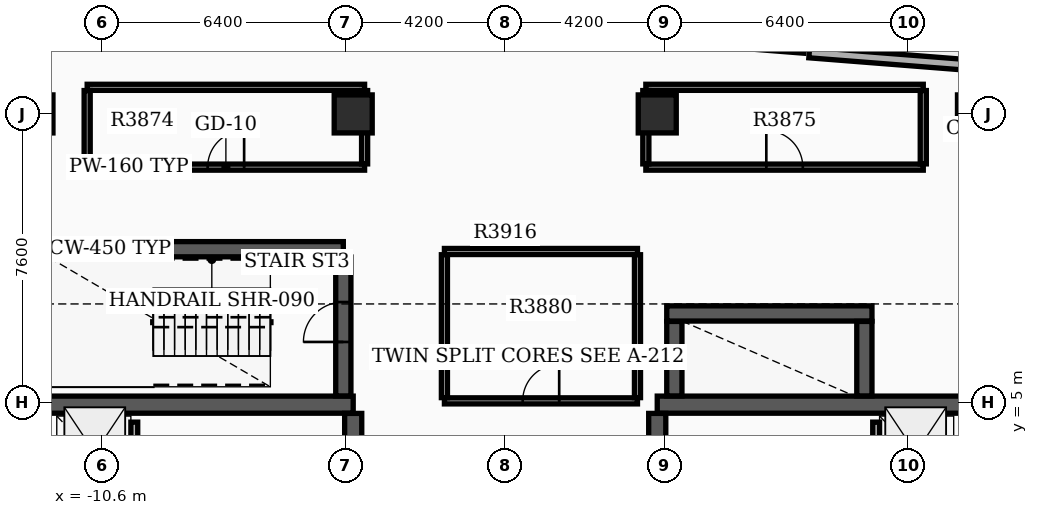
"""IFC4 building model, lengths in metres.
Left out: names, types, materials, properties, quantities, classifications, styles, units other than length and angle.
Written with IfcOpenShell. Run it as: python <this file> out.ifc"""

import sys

from ifc_helpers import new_model, si_unit, direction, frame, frame_2d, origin, origin_2d, place, context, subcontext, project, spatial, rectangle, extrude, element, fill, save


model = new_model("IFC4")
c1 = context("Model", 3, precision=1e-05, world=origin(), true_north=direction((0.0, 1.0)))
c2 = subcontext(c1, "Body", "Model", "MODEL_VIEW")
j1 = project(units=[si_unit("LENGTHUNIT", "METRE"), si_unit("PLANEANGLEUNIT", "RADIAN")], contexts=[c1])
p1 = place(None, origin())
s1 = spatial("IfcSite", under=j1, at=p1, CompositionType="ELEMENT")
p2 = place(p1, origin())
s2 = spatial("IfcBuilding", under=s1, at=p2, CompositionType="ELEMENT")
p3 = place(p2, frame((0.0, 0.0, 245.4)))
s3 = spatial("IfcBuildingStorey", under=s2, at=p3, CompositionType="ELEMENT", Elevation=245.4)
p4 = place(p3, frame((-12.4, 4.95, 0.0), z_axis=(0.0, 0.0, 1.0), x_axis=(1.0, 0.0, 0.0)))
e1 = element("IfcWall", 1, at=p4, inside=s3, PredefinedType="SHEAR", context=c2, shape_type="SweptSolid", body=[
    extrude(rectangle(XDim=8.4, YDim=0.45, at=frame_2d((4.2, 0.0))), origin(), (0.0, 0.0, 1.0), 4.3),
])
p5 = place(p3, frame((-4.0, -6.62, 0.0), z_axis=(0.0, 0.0, 1.0), x_axis=(0.0, 1.0, 0.0)))
e2 = element("IfcWall", 2, at=p5, inside=s3, PredefinedType="SHEAR", context=c2, shape_type="SweptSolid", body=[
    extrude(rectangle(XDim=11.34, YDim=0.45, at=frame_2d((5.67, 0.0))), origin(), (0.0, 0.0, 1.0), 4.3),
])
p6 = place(p5, frame((1.37, 0.0, 0.0)))
e3 = element("IfcOpeningElement", 3, at=p6, cuts=e2, PredefinedType="OPENING", context=c2, shape_type="SweptSolid", body=[
    extrude(rectangle(XDim=1.05, YDim=2.15, at=frame_2d((0.525, 1.075))), frame((0.0, 0.235, 0.0), z_axis=(0.0, -1.0, 0.0), x_axis=(1.0, 0.0, 0.0)), (0.0, 0.0, 1.0), 0.47),
])
p7 = place(p5, frame((6.97, 0.0, 0.0)))
e4 = element("IfcOpeningElement", 4, at=p7, cuts=e2, PredefinedType="OPENING", context=c2, shape_type="SweptSolid", body=[
    extrude(rectangle(XDim=1.05, YDim=2.15, at=frame_2d((0.525, 1.075))), frame((0.0, 0.235, 0.0), z_axis=(0.0, -1.0, 0.0), x_axis=(1.0, 0.0, 0.0)), (0.0, 0.0, 1.0), 0.47),
])
p8 = place(p3, frame((4.0, 4.95, 0.0), z_axis=(0.0, 0.0, 1.0), x_axis=(1.0, 0.0, 0.0)))
e5 = element("IfcWall", 5, at=p8, inside=s3, PredefinedType="SHEAR", context=c2, shape_type="SweptSolid", body=[
    extrude(rectangle(XDim=8.4, YDim=0.45, at=frame_2d((4.2, 0.0))), origin(), (0.0, 0.0, 1.0), 4.3),
])
p9 = place(p3, frame((4.0, -6.62, 0.0), z_axis=(0.0, 0.0, 1.0), x_axis=(0.0, 1.0, 0.0)))
e6 = element("IfcWall", 6, at=p9, inside=s3, PredefinedType="SHEAR", context=c2, shape_type="SweptSolid", body=[
    extrude(rectangle(XDim=11.34, YDim=0.45, at=frame_2d((5.67, 0.0))), origin(), (0.0, 0.0, 1.0), 4.3),
])
p10 = place(p9, frame((1.37, 0.0, 0.0)))
e7 = element("IfcOpeningElement", 7, at=p10, cuts=e6, PredefinedType="OPENING", context=c2, shape_type="SweptSolid", body=[
    extrude(rectangle(XDim=1.05, YDim=2.15, at=frame_2d((0.525, 1.075))), frame((0.0, 0.235, 0.0), z_axis=(0.0, -1.0, 0.0), x_axis=(1.0, 0.0, 0.0)), (0.0, 0.0, 1.0), 0.47),
])
p11 = place(p9, frame((6.97, 0.0, 0.0)))
e8 = element("IfcOpeningElement", 8, at=p11, cuts=e6, PredefinedType="OPENING", context=c2, shape_type="SweptSolid", body=[
    extrude(rectangle(XDim=1.05, YDim=2.15, at=frame_2d((0.525, 1.075))), frame((0.0, 0.235, 0.0), z_axis=(0.0, -1.0, 0.0), x_axis=(1.0, 0.0, 0.0)), (0.0, 0.0, 1.0), 0.47),
])
p12 = place(p3, frame((-12.22, 9.04, 0.0), z_axis=(0.0, 0.0, 1.0), x_axis=(1.0, 0.0, 0.0)))
e9 = element("IfcWall", 9, at=p12, inside=s3, PredefinedType="SHEAR", context=c2, shape_type="SweptSolid", body=[
    extrude(rectangle(XDim=7.96, YDim=0.4, at=frame_2d((3.98, 0.0))), origin(), (0.0, 0.0, 1.0), 4.3),
])
p13 = place(p3, frame((-4.26, 5.18, 0.0), z_axis=(0.0, 0.0, 1.0), x_axis=(0.0, 1.0, 0.0)))
e10 = element("IfcWall", 10, at=p13, inside=s3, PredefinedType="SHEAR", context=c2, shape_type="SweptSolid", body=[
    extrude(rectangle(XDim=3.655, YDim=0.4, at=frame_2d((1.828, 0.0))), origin(), (0.0, 0.0, 1.0), 4.3),
])
p14 = place(p13, frame((1.42, 0.0, 0.0)))
e11 = element("IfcOpeningElement", 11, at=p14, cuts=e10, PredefinedType="OPENING", context=c2, shape_type="SweptSolid", body=[
    extrude(rectangle(XDim=1.05, YDim=2.15, at=frame_2d((0.525, 1.075))), frame((0.0, 0.21, 0.0), z_axis=(0.0, -1.0, 0.0), x_axis=(1.0, 0.0, 0.0)), (0.0, 0.0, 1.0), 0.42),
])
p15 = place(p3, frame((4.45, 5.18, 0.0), z_axis=(0.0, 0.0, 1.0), x_axis=(0.0, 1.0, 0.0)))
e12 = element("IfcWall", 12, at=p15, inside=s3, PredefinedType="SHEAR", context=c2, shape_type="SweptSolid", body=[
    extrude(rectangle(XDim=1.96, YDim=0.4, at=frame_2d((0.98, 0.0))), origin(), (0.0, 0.0, 1.0), 4.3),
])
p16 = place(p3, frame((4.25, 7.35, 0.0), z_axis=(0.0, 0.0, 1.0), x_axis=(1.0, 0.0, 0.0)))
e13 = element("IfcWall", 13, at=p16, inside=s3, PredefinedType="SHEAR", context=c2, shape_type="SweptSolid", body=[
    extrude(rectangle(XDim=5.4, YDim=0.4, at=frame_2d((2.7, 0.0))), origin(), (0.0, 0.0, 1.0), 4.3),
])
p17 = place(p3, frame((9.45, 5.18, 0.0), z_axis=(0.0, 0.0, 1.0), x_axis=(0.0, 1.0, 0.0)))
e14 = element("IfcWall", 14, at=p17, inside=s3, PredefinedType="SHEAR", context=c2, shape_type="SweptSolid", body=[
    extrude(rectangle(XDim=1.96, YDim=0.4, at=frame_2d((0.98, 0.0))), origin(), (0.0, 0.0, 1.0), 4.3),
])
for number, where, z_axis, x_axis in (
    (15, (12.4, 12.6, 0.0), (0.0, 0.0, 1.0), (1.0, 0.0, 0.0)),
    (16, (-12.4, 12.6, 0.0), (0.0, 0.0, 1.0), (1.0, 0.0, 0.0)),
    (17, (4.0, 12.6, 0.0), (0.0, 0.0, 1.0), (1.0, 0.0, 0.0)),
    (18, (-4.0, 12.6, 0.0), (0.0, 0.0, 1.0), (1.0, 0.0, 0.0)),
):
    element("IfcColumn", number, at=place(p3, frame(where, z_axis=z_axis, x_axis=x_axis)), inside=s3, PredefinedType="COLUMN", context=c2, shape_type="SweptSolid", body=[
        extrude(rectangle(XDim=1.0, YDim=1.0, at=origin_2d()), origin(), (0.0, 0.0, 1.0), 4.5),
    ])
p18 = place(p3, frame((14.281, 13.722, 0.0), z_axis=(0.0, 0.0, 1.0), x_axis=(-0.99691915642, 0.078435932851, 0.0)))
e19 = element("IfcWall", 19, at=p18, inside=s3, PredefinedType="STANDARD", context=c2, shape_type="SweptSolid", body=[
    extrude(rectangle(XDim=6.3, YDim=0.28, at=frame_2d((3.15, 0.0))), origin(), (0.0, 0.0, 1.0), 3.38),
])
for number, where, z_axis, x_axis in (
    (20, (-9.76, 2.5, 0.0), (0.0, 0.0, 1.0), (0.0, 1.0, 0.0)),
    (21, (9.76, 2.5, 0.0), (0.0, 0.0, 1.0), (0.0, 1.0, 0.0)),
):
    element("IfcWall", number, at=place(p3, frame(where, z_axis=z_axis, x_axis=x_axis)), inside=s3, PredefinedType="SOLIDWALL", context=c2, shape_type="SweptSolid", body=[
        extrude(rectangle(XDim=1.99, YDim=0.18, at=frame_2d((0.995, 0.0))), origin(), (0.0, 0.0, 1.0), 3.37),
    ])
p19 = place(p3, frame((-11.0, 11.2, 0.0), z_axis=(0.0, 0.0, 1.0), x_axis=(1.0, 0.0, 0.0)))
e22 = element("IfcWall", 22, at=p19, inside=s3, PredefinedType="PARTITIONING", context=c2, shape_type="SweptSolid", body=[
    extrude(rectangle(XDim=7.3, YDim=0.16, at=frame_2d((3.65, 0.0))), origin(), (0.0, 0.0, 1.0), 3.37),
])
p20 = place(p19, frame((3.17, 0.0, 0.0)))
e23 = element("IfcOpeningElement", 23, at=p20, cuts=e22, PredefinedType="OPENING", context=c2, shape_type="SweptSolid", body=[
    extrude(rectangle(XDim=0.96, YDim=2.15, at=frame_2d((0.48, 1.075))), frame((0.0, 0.09, 0.0), z_axis=(0.0, -1.0, 0.0), x_axis=(1.0, 0.0, 0.0)), (0.0, 0.0, 1.0), 0.18),
])
p21 = place(p3, frame((-11.0, 13.3, 0.0), z_axis=(0.0, 0.0, 1.0), x_axis=(1.0, 0.0, 0.0)))
e24 = element("IfcWall", 24, at=p21, inside=s3, PredefinedType="PARTITIONING", context=c2, shape_type="SweptSolid", body=[
    extrude(rectangle(XDim=7.3, YDim=0.16, at=frame_2d((3.65, 0.0))), origin(), (0.0, 0.0, 1.0), 3.37),
])
for number, where, z_axis, x_axis in (
    (25, (-11.0, 11.285, 0.0), (0.0, 0.0, 1.0), (0.0, 1.0, 0.0)),
    (26, (-3.7, 11.285, 0.0), (0.0, 0.0, 1.0), (0.0, 1.0, 0.0)),
):
    element("IfcWall", number, at=place(p3, frame(where, z_axis=z_axis, x_axis=x_axis)), inside=s3, PredefinedType="PARTITIONING", context=c2, shape_type="SweptSolid", body=[
        extrude(rectangle(XDim=1.93, YDim=0.16, at=frame_2d((0.965, 0.0))), origin(), (0.0, 0.0, 1.0), 3.37),
    ])
p22 = place(p3, frame((3.7, 11.2, 0.0), z_axis=(0.0, 0.0, 1.0), x_axis=(1.0, 0.0, 0.0)))
e27 = element("IfcWall", 27, at=p22, inside=s3, PredefinedType="PARTITIONING", context=c2, shape_type="SweptSolid", body=[
    extrude(rectangle(XDim=7.3, YDim=0.16, at=frame_2d((3.65, 0.0))), origin(), (0.0, 0.0, 1.0), 3.37),
])
p23 = place(p22, frame((3.17, 0.0, 0.0)))
e28 = element("IfcOpeningElement", 28, at=p23, cuts=e27, PredefinedType="OPENING", context=c2, shape_type="SweptSolid", body=[
    extrude(rectangle(XDim=0.96, YDim=2.15, at=frame_2d((0.48, 1.075))), frame((0.0, 0.09, 0.0), z_axis=(0.0, -1.0, 0.0), x_axis=(1.0, 0.0, 0.0)), (0.0, 0.0, 1.0), 0.18),
])
p24 = place(p3, frame((3.7, 13.3, 0.0), z_axis=(0.0, 0.0, 1.0), x_axis=(1.0, 0.0, 0.0)))
e29 = element("IfcWall", 29, at=p24, inside=s3, PredefinedType="PARTITIONING", context=c2, shape_type="SweptSolid", body=[
    extrude(rectangle(XDim=7.3, YDim=0.16, at=frame_2d((3.65, 0.0))), origin(), (0.0, 0.0, 1.0), 3.37),
])
for number, where, z_axis, x_axis in (
    (30, (3.7, 11.285, 0.0), (0.0, 0.0, 1.0), (0.0, 1.0, 0.0)),
    (31, (11.0, 11.285, 0.0), (0.0, 0.0, 1.0), (0.0, 1.0, 0.0)),
):
    element("IfcWall", number, at=place(p3, frame(where, z_axis=z_axis, x_axis=x_axis)), inside=s3, PredefinedType="PARTITIONING", context=c2, shape_type="SweptSolid", body=[
        extrude(rectangle(XDim=1.93, YDim=0.16, at=frame_2d((0.965, 0.0))), origin(), (0.0, 0.0, 1.0), 3.37),
    ])
p25 = place(p3, frame((-1.6, 5.05, 0.0), z_axis=(0.0, 0.0, 1.0), x_axis=(1.0, 0.0, 0.0)))
e32 = element("IfcWall", 32, at=p25, inside=s3, PredefinedType="PARTITIONING", context=c2, shape_type="SweptSolid", body=[
    extrude(rectangle(XDim=5.08, YDim=0.16, at=frame_2d((2.54, 0.0))), origin(), (0.0, 0.0, 1.0), 3.37),
])
p26 = place(p25, frame((2.06, 0.0, 0.0)))
e33 = element("IfcOpeningElement", 33, at=p26, cuts=e32, PredefinedType="OPENING", context=c2, shape_type="SweptSolid", body=[
    extrude(rectangle(XDim=0.96, YDim=2.15, at=frame_2d((0.48, 1.075))), frame((0.0, 0.09, 0.0), z_axis=(0.0, -1.0, 0.0), x_axis=(1.0, 0.0, 0.0)), (0.0, 0.0, 1.0), 0.18),
])
p27 = place(p3, frame((-1.6, 8.98, 0.0), z_axis=(0.0, 0.0, 1.0), x_axis=(1.0, 0.0, 0.0)))
e34 = element("IfcWall", 34, at=p27, inside=s3, PredefinedType="PARTITIONING", context=c2, shape_type="SweptSolid", body=[
    extrude(rectangle(XDim=5.08, YDim=0.16, at=frame_2d((2.54, 0.0))), origin(), (0.0, 0.0, 1.0), 3.37),
])
for number, where, z_axis, x_axis in (
    (35, (-1.6, 5.135, 0.0), (0.0, 0.0, 1.0), (0.0, 1.0, 0.0)),
    (36, (3.48, 5.135, 0.0), (0.0, 0.0, 1.0), (0.0, 1.0, 0.0)),
):
    element("IfcWall", number, at=place(p3, frame(where, z_axis=z_axis, x_axis=x_axis)), inside=s3, PredefinedType="PARTITIONING", context=c2, shape_type="SweptSolid", body=[
        extrude(rectangle(XDim=3.76, YDim=0.16, at=frame_2d((1.88, 0.0))), origin(), (0.0, 0.0, 1.0), 3.37),
    ])
p28 = place(p3, frame((1.823, 14.752, 0.0), z_axis=(0.0, 0.0, 1.0), x_axis=(0.996919074253, -0.078436977191, 0.0)))
e37 = element("IfcWall", 37, at=p28, inside=s3, PredefinedType="PARTITIONING", context=c2, shape_type="SweptSolid", body=[
    extrude(rectangle(XDim=6.06, YDim=0.16, at=frame_2d((3.03, 0.0))), origin(), (0.0, 0.0, 1.0), 3.37),
])
p29 = place(p14, origin())
e38 = element("IfcDoor", 38, at=p29, inside=s3, OperationType="SINGLE_SWING_LEFT", PredefinedType="DOOR", context=c2, shape_type="SweptSolid", body=[
    extrude(rectangle(XDim=1.05, YDim=2.15, at=frame_2d((0.525, 1.075))), frame((0.0, 0.025, 0.0), z_axis=(0.0, -1.0, 0.0), x_axis=(1.0, 0.0, 0.0)), (0.0, 0.0, 1.0), 0.05),
])
fill(e11, e38)
p30 = place(p20, origin())
e39 = element("IfcDoor", 39, at=p30, inside=s3, OperationType="SINGLE_SWING_RIGHT", PredefinedType="DOOR", context=c2, shape_type="SweptSolid", body=[
    extrude(rectangle(XDim=0.96, YDim=2.15, at=frame_2d((0.48, 1.075))), frame((0.0, 0.025, 0.0), z_axis=(0.0, -1.0, 0.0), x_axis=(1.0, 0.0, 0.0)), (0.0, 0.0, 1.0), 0.05),
])
fill(e23, e39)
p31 = place(p23, origin())
e40 = element("IfcDoor", 40, at=p31, inside=s3, OperationType="SINGLE_SWING_LEFT", PredefinedType="DOOR", context=c2, shape_type="SweptSolid", body=[
    extrude(rectangle(XDim=0.96, YDim=2.15, at=frame_2d((0.48, 1.075))), frame((0.0, 0.025, 0.0), z_axis=(0.0, -1.0, 0.0), x_axis=(1.0, 0.0, 0.0)), (0.0, 0.0, 1.0), 0.05),
])
fill(e28, e40)
p32 = place(p26, origin())
e41 = element("IfcDoor", 41, at=p32, inside=s3, OperationType="SINGLE_SWING_RIGHT", PredefinedType="DOOR", context=c2, shape_type="SweptSolid", body=[
    extrude(rectangle(XDim=0.96, YDim=2.15, at=frame_2d((0.48, 1.075))), frame((0.0, 0.025, 0.0), z_axis=(0.0, -1.0, 0.0), x_axis=(1.0, 0.0, 0.0)), (0.0, 0.0, 1.0), 0.05),
])
fill(e33, e41)
save(model, sys.argv[1])
